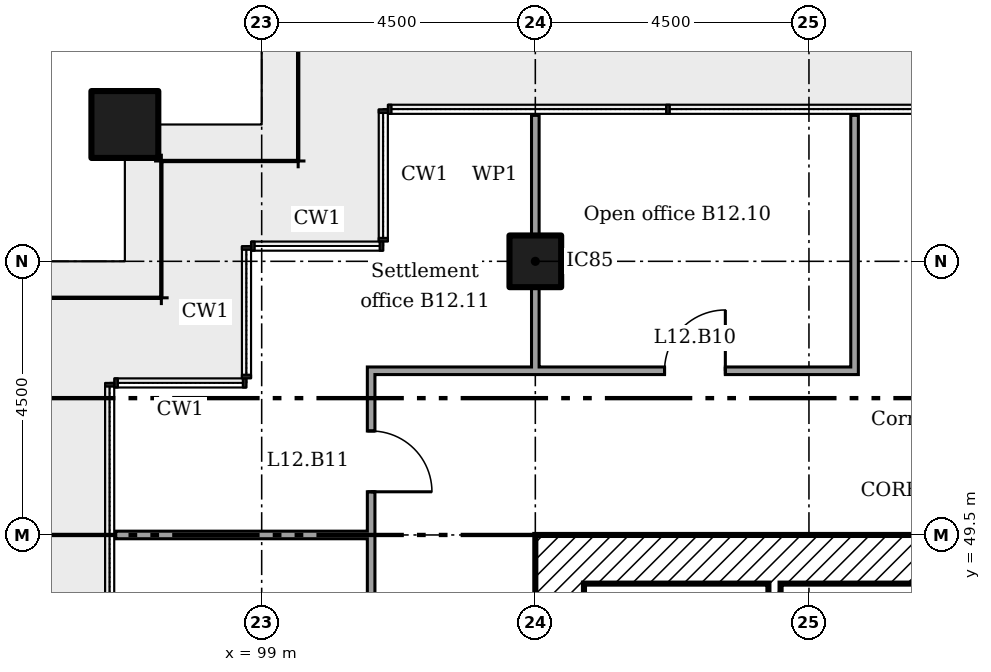
"""IFC4 building model, lengths in metres.
Left out: names, types, materials, properties, quantities, classifications, styles, units other than length and angle.
Written with IfcOpenShell. Run it as: python <this file> out.ifc"""

import sys

from ifc_helpers import new_model, si_unit, direction, frame, frame_2d, origin, origin_2d, place, context, subcontext, project, spatial, rectangle, extrude, element, fill, save


model = new_model("IFC4")
c1 = context("Model", 3, precision=1e-05, world=origin(), true_north=direction((0.0, 1.0)))
c2 = subcontext(c1, "Body", "Model", "MODEL_VIEW")
j1 = project(units=[si_unit("LENGTHUNIT", "METRE"), si_unit("PLANEANGLEUNIT", "RADIAN")], contexts=[c1])
p1 = place(None, origin())
s1 = spatial("IfcSite", under=j1, at=p1, CompositionType="ELEMENT")
p2 = place(p1, origin())
s2 = spatial("IfcBuilding", under=s1, at=p2, CompositionType="ELEMENT")
p3 = place(p2, frame((0.0, 0.0, 54.6)))
s3 = spatial("IfcBuildingStorey", under=s2, at=p3, CompositionType="ELEMENT", Elevation=54.6)
p4 = place(p3, frame((96.75, 56.25, 0.0)))
e1 = element("IfcColumn", 1, at=p4, inside=s3, PredefinedType="COLUMN", context=c2, shape_type="SweptSolid", body=[
    extrude(rectangle(XDim=1.1, YDim=1.1, at=origin_2d()), origin(), (0.0, 0.0, 1.0), 3.6),
])
p5 = place(p3, frame((103.5, 54.0, 0.0)))
e2 = element("IfcColumn", 2, at=p5, inside=s3, PredefinedType="COLUMN", context=c2, shape_type="SweptSolid", body=[
    extrude(rectangle(XDim=0.85, YDim=0.85, at=origin_2d()), origin(), (0.0, 0.0, 1.0), 3.6),
])
p6 = place(p3, frame((104.3, 49.1, 0.0)))
e3 = element("IfcWall", 3, at=p6, inside=s3, PredefinedType="SHEAR", context=c2, shape_type="SweptSolid", body=[
    extrude(rectangle(XDim=11.9, YDim=0.8, at=frame_2d((5.95, 0.0))), origin(), (0.0, 0.0, 1.0), 3.35),
])
p7 = place(p3, frame((103.9, 36.0, 0.0), z_axis=(0.0, 0.0, 1.0), x_axis=(0.0, 1.0, 0.0)))
e4 = element("IfcWall", 4, at=p7, inside=s3, PredefinedType="SHEAR", context=c2, shape_type="SweptSolid", body=[
    extrude(rectangle(XDim=13.5, YDim=0.8, at=frame_2d((6.75, 0.0))), origin(), (0.0, 0.0, 1.0), 3.35),
])
p8 = place(p7, frame((8.2, 0.0, 0.0)))
e5 = element("IfcOpeningElement", 5, at=p8, cuts=e4, PredefinedType="OPENING", context=c2, shape_type="SweptSolid", body=[
    extrude(rectangle(XDim=1.2, YDim=2.1, at=frame_2d((0.6, 1.05))), frame((0.0, 0.41, 0.0), z_axis=(0.0, -1.0, 0.0), x_axis=(1.0, 0.0, 0.0)), (0.0, 0.0, 1.0), 0.82),
])
p9 = place(p7, frame((6.225, 0.0, 0.0)))
e6 = element("IfcOpeningElement", 6, at=p9, cuts=e4, PredefinedType="OPENING", context=c2, shape_type="SweptSolid", body=[
    extrude(rectangle(XDim=1.0, YDim=2.1, at=frame_2d((0.5, 1.05))), frame((0.0, 0.41, 0.0), z_axis=(0.0, -1.0, 0.0), x_axis=(1.0, 0.0, 0.0)), (0.0, 0.0, 1.0), 0.82),
])
p10 = place(p3, frame((107.433, 48.7, 0.0), z_axis=(0.0, 0.0, 1.0), x_axis=(0.0, -1.0, 0.0)))
e7 = element("IfcWall", 7, at=p10, inside=s3, PredefinedType="SHEAR", context=c2, shape_type="SweptSolid", body=[
    extrude(rectangle(XDim=3.5, YDim=0.2, at=frame_2d((1.75, 0.0))), origin(), (0.0, 0.0, 1.0), 3.35),
])
p11 = place(p3, frame((96.6, 49.5, 0.0)))
e8 = element("IfcWall", 8, at=p11, inside=s3, PredefinedType="PARTITIONING", context=c2, shape_type="SweptSolid", body=[
    extrude(rectangle(XDim=4.2, YDim=0.125, at=frame_2d((2.1, 0.0))), origin(), (0.0, 0.0, 1.0), 2.851),
])
p12 = place(p3, frame((100.738, 52.2, 0.0)))
e9 = element("IfcWall", 9, at=p12, inside=s3, PredefinedType="PARTITIONING", context=c2, shape_type="SweptSolid", body=[
    extrude(rectangle(XDim=8.075, YDim=0.125, at=frame_2d((4.038, 0.0))), origin(), (0.0, 0.0, 1.0), 3.45),
])
p13 = place(p12, frame((4.887, 0.0, 0.0)))
e10 = element("IfcOpeningElement", 10, at=p13, cuts=e9, PredefinedType="OPENING", context=c2, shape_type="SweptSolid", body=[
    extrude(rectangle(XDim=1.0, YDim=2.1, at=frame_2d((0.5, 1.05))), frame((0.0, 0.073, 0.0), z_axis=(0.0, -1.0, 0.0), x_axis=(1.0, 0.0, 0.0)), (0.0, 0.0, 1.0), 0.145),
])
p14 = place(p3, frame((100.8, 33.962, 0.0), z_axis=(0.0, 0.0, 1.0), x_axis=(0.0, 1.0, 0.0)))
e11 = element("IfcWall", 11, at=p14, inside=s3, PredefinedType="PARTITIONING", context=c2, shape_type="SweptSolid", body=[
    extrude(rectangle(XDim=18.175, YDim=0.125, at=frame_2d((9.087, 0.0))), origin(), (0.0, 0.0, 1.0), 3.45),
])
p15 = place(p14, frame((8.288, 0.0, 0.0)))
e12 = element("IfcOpeningElement", 12, at=p15, cuts=e11, PredefinedType="OPENING", context=c2, shape_type="SweptSolid", body=[
    extrude(rectangle(XDim=1.0, YDim=2.1, at=frame_2d((0.5, 1.05))), frame((0.0, 0.073, 0.0), z_axis=(0.0, -1.0, 0.0), x_axis=(1.0, 0.0, 0.0)), (0.0, 0.0, 1.0), 0.145),
])
p16 = place(p14, frame((3.333, 0.0, 0.0)))
e13 = element("IfcOpeningElement", 13, at=p16, cuts=e11, PredefinedType="OPENING", context=c2, shape_type="SweptSolid", body=[
    extrude(rectangle(XDim=1.0, YDim=2.1, at=frame_2d((0.5, 1.05))), frame((0.0, 0.073, 0.0), z_axis=(0.0, -1.0, 0.0), x_axis=(1.0, 0.0, 0.0)), (0.0, 0.0, 1.0), 0.145),
])
p17 = place(p14, frame((0.522, 0.0, 0.0)))
e14 = element("IfcOpeningElement", 14, at=p17, cuts=e11, PredefinedType="OPENING", context=c2, shape_type="SweptSolid", body=[
    extrude(rectangle(XDim=1.0, YDim=2.1, at=frame_2d((0.5, 1.05))), frame((0.0, 0.073, 0.0), z_axis=(0.0, -1.0, 0.0), x_axis=(1.0, 0.0, 0.0)), (0.0, 0.0, 1.0), 0.145),
])
p18 = place(p14, frame((16.248, 0.0, 0.0)))
e15 = element("IfcOpeningElement", 15, at=p18, cuts=e11, PredefinedType="OPENING", context=c2, shape_type="SweptSolid", body=[
    extrude(rectangle(XDim=1.0, YDim=2.1, at=frame_2d((0.5, 1.05))), frame((0.0, 0.073, 0.0), z_axis=(0.0, -1.0, 0.0), x_axis=(1.0, 0.0, 0.0)), (0.0, 0.0, 1.0), 0.145),
])
p19 = place(p14, frame((13.242, 0.0, 0.0)))
e16 = element("IfcOpeningElement", 16, at=p19, cuts=e11, PredefinedType="OPENING", context=c2, shape_type="SweptSolid", body=[
    extrude(rectangle(XDim=1.0, YDim=2.1, at=frame_2d((0.5, 1.05))), frame((0.0, 0.073, 0.0), z_axis=(0.0, -1.0, 0.0), x_axis=(1.0, 0.0, 0.0)), (0.0, 0.0, 1.0), 0.145),
])
p20 = place(p3, frame((103.5, 52.2, 0.0), z_axis=(0.0, 0.0, 1.0), x_axis=(0.0, 1.0, 0.0)))
e17 = element("IfcWall", 17, at=p20, inside=s3, PredefinedType="PARTITIONING", context=c2, shape_type="SweptSolid", body=[
    extrude(rectangle(XDim=1.375, YDim=0.125, at=frame_2d((0.688, 0.0))), origin(), (0.0, 0.0, 1.0), 2.842),
])
p21 = place(p3, frame((103.5, 54.425, 0.0), z_axis=(0.0, 0.0, 1.0), x_axis=(0.0, 1.0, 0.0)))
e18 = element("IfcWall", 18, at=p21, inside=s3, PredefinedType="PARTITIONING", context=c2, shape_type="SweptSolid", body=[
    extrude(rectangle(XDim=1.975, YDim=0.125, at=frame_2d((0.987, 0.0))), origin(), (0.0, 0.0, 1.0), 2.842),
])
p22 = place(p3, frame((108.75, 52.262, 0.0), z_axis=(0.0, 0.0, 1.0), x_axis=(0.0, 1.0, 0.0)))
e19 = element("IfcWall", 19, at=p22, inside=s3, PredefinedType="PARTITIONING", context=c2, shape_type="SweptSolid", body=[
    extrude(rectangle(XDim=4.137, YDim=0.125, at=frame_2d((2.069, 0.0))), origin(), (0.0, 0.0, 1.0), 3.45),
])
p23 = place(p13, origin())
e20 = element("IfcDoor", 20, at=p23, inside=s3, OperationType="SINGLE_SWING_LEFT", PredefinedType="DOOR", context=c2, shape_type="SweptSolid", body=[
    extrude(rectangle(XDim=1.0, YDim=2.1, at=frame_2d((0.5, 1.05))), frame((0.0, 0.025, 0.0), z_axis=(0.0, -1.0, 0.0), x_axis=(1.0, 0.0, 0.0)), (0.0, 0.0, 1.0), 0.05),
])
fill(e10, e20)
p24 = place(p18, frame((1.0, 0.0, 0.0), x_axis=(-1.0, 0.0, 0.0)))
e21 = element("IfcDoor", 21, at=p24, inside=s3, OperationType="SINGLE_SWING_LEFT", PredefinedType="DOOR", context=c2, shape_type="SweptSolid", body=[
    extrude(rectangle(XDim=1.0, YDim=2.1, at=frame_2d((0.5, 1.05))), frame((0.0, 0.025, 0.0), z_axis=(0.0, -1.0, 0.0), x_axis=(1.0, 0.0, 0.0)), (0.0, 0.0, 1.0), 0.05),
])
fill(e15, e21)
save(model, sys.argv[1])
